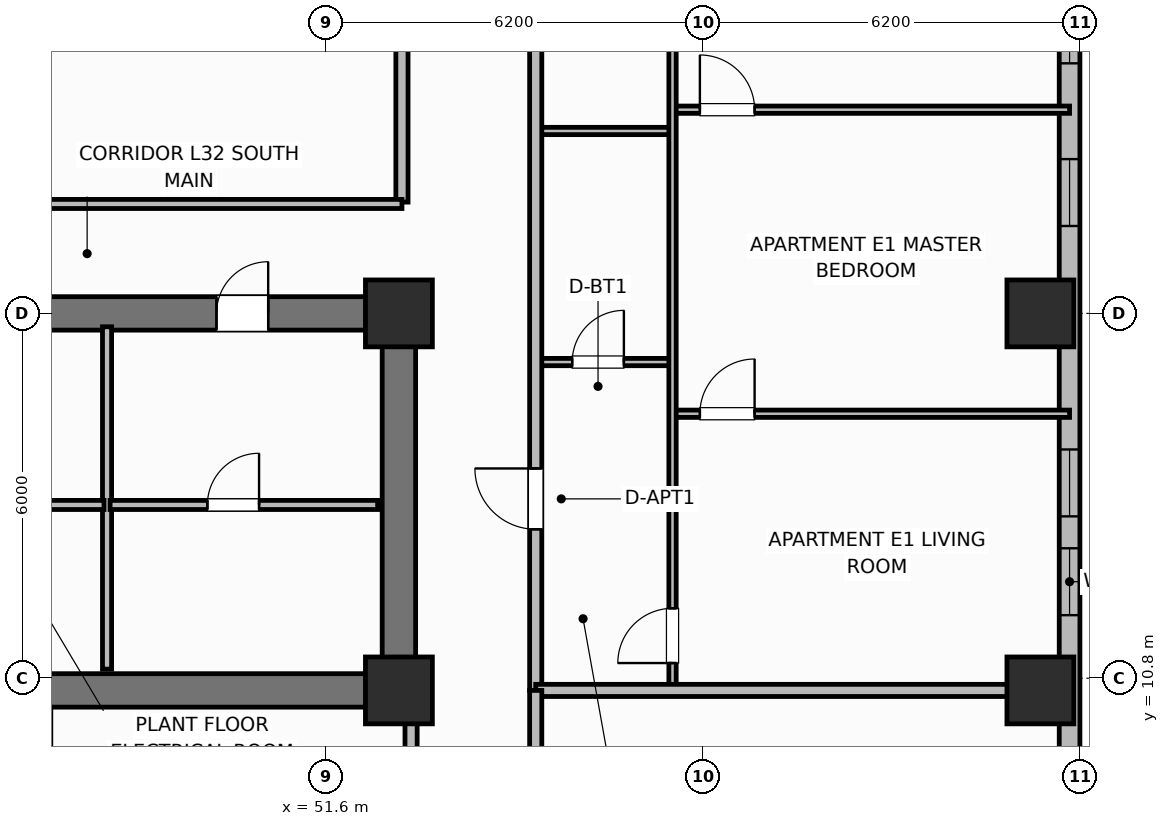
"""IFC4 building model, lengths in metres.
Left out: names, types, materials, properties, quantities, classifications, styles, units other than length and angle.
Written with IfcOpenShell. Run it as: python <this file> out.ifc"""

import sys

from ifc_helpers import new_model, si_unit, direction, frame, frame_2d, origin, origin_2d, place, context, subcontext, project, spatial, rectangle, extrude, element, fill, save


model = new_model("IFC4")
c1 = context("Model", 3, precision=1e-05, world=origin(), true_north=direction((0.0, 1.0)))
c2 = subcontext(c1, "Body", "Model", "MODEL_VIEW")
j1 = project(units=[si_unit("LENGTHUNIT", "METRE"), si_unit("PLANEANGLEUNIT", "RADIAN")], contexts=[c1])
p1 = place(None, origin())
s1 = spatial("IfcSite", under=j1, at=p1, CompositionType="ELEMENT")
p2 = place(p1, origin())
s2 = spatial("IfcBuilding", under=s1, at=p2, CompositionType="ELEMENT")
p3 = place(p2, frame((0.0, 0.0, 129.0)))
s3 = spatial("IfcBuildingStorey", under=s2, at=p3, CompositionType="ELEMENT", Elevation=129.0)
p4 = place(p3, frame((52.8, 10.6, 0.0), z_axis=(0.0, 0.0, 1.0), x_axis=(-1.0, 0.0, 0.0)))
e1 = element("IfcWall", 1, at=p4, inside=s3, PredefinedType="SHEAR", context=c2, shape_type="SweptSolid", body=[
    extrude(rectangle(XDim=27.2, YDim=0.55, at=frame_2d((13.6, 0.0))), origin(), (0.0, 0.0, 1.0), 3.7),
])
p5 = place(p3, frame((52.8, 10.875, 0.0), z_axis=(0.0, 0.0, 1.0), x_axis=(0.0, 1.0, 0.0)))
e2 = element("IfcWall", 2, at=p5, inside=s3, PredefinedType="SHEAR", context=c2, shape_type="SweptSolid", body=[
    extrude(rectangle(XDim=5.65, YDim=0.55, at=frame_2d((2.825, 0.0))), origin(), (0.0, 0.0, 1.0), 3.7),
])
p6 = place(p3, frame((25.6, 16.8, 0.0), z_axis=(0.0, 0.0, 1.0), x_axis=(1.0, 0.0, 0.0)))
e3 = element("IfcWall", 3, at=p6, inside=s3, PredefinedType="SHEAR", context=c2, shape_type="SweptSolid", body=[
    extrude(rectangle(XDim=27.2, YDim=0.55, at=frame_2d((13.6, 0.0))), origin(), (0.0, 0.0, 1.0), 3.7),
])
p7 = place(p6, frame((1.7, 0.0, 0.0)))
e4 = element("IfcOpeningElement", 4, at=p7, cuts=e3, PredefinedType="OPENING", context=c2, shape_type="SweptSolid", body=[
    extrude(rectangle(XDim=1.1, YDim=2.15, at=frame_2d((0.55, 1.075))), frame((0.0, 0.285, 0.0), z_axis=(0.0, -1.0, 0.0), x_axis=(1.0, 0.0, 0.0)), (0.0, 0.0, 1.0), 0.57),
])
p8 = place(p6, frame((4.45, 0.0, 0.0)))
e5 = element("IfcOpeningElement", 5, at=p8, cuts=e3, PredefinedType="OPENING", context=c2, shape_type="SweptSolid", body=[
    extrude(rectangle(XDim=0.85, YDim=2.1, at=frame_2d((0.425, 1.05))), frame((0.0, 0.285, 0.0), z_axis=(0.0, -1.0, 0.0), x_axis=(1.0, 0.0, 0.0)), (0.0, 0.0, 1.0), 0.57),
])
p9 = place(p6, frame((6.5, 0.0, 0.0)))
e6 = element("IfcOpeningElement", 6, at=p9, cuts=e3, PredefinedType="OPENING", context=c2, shape_type="SweptSolid", body=[
    extrude(rectangle(XDim=0.85, YDim=2.1, at=frame_2d((0.425, 1.05))), frame((0.0, 0.285, 0.0), z_axis=(0.0, -1.0, 0.0), x_axis=(1.0, 0.0, 0.0)), (0.0, 0.0, 1.0), 0.57),
])
p10 = place(p6, frame((13.0, 0.0, 0.0)))
e7 = element("IfcOpeningElement", 7, at=p10, cuts=e3, PredefinedType="OPENING", context=c2, shape_type="SweptSolid", body=[
    extrude(rectangle(XDim=1.2, YDim=2.15, at=frame_2d((0.6, 1.075))), frame((0.0, 0.285, 0.0), z_axis=(0.0, -1.0, 0.0), x_axis=(1.0, 0.0, 0.0)), (0.0, 0.0, 1.0), 0.57),
])
p11 = place(p6, frame((19.8, 0.0, 0.0)))
e8 = element("IfcOpeningElement", 8, at=p11, cuts=e3, PredefinedType="OPENING", context=c2, shape_type="SweptSolid", body=[
    extrude(rectangle(XDim=0.85, YDim=2.1, at=frame_2d((0.425, 1.05))), frame((0.0, 0.285, 0.0), z_axis=(0.0, -1.0, 0.0), x_axis=(1.0, 0.0, 0.0)), (0.0, 0.0, 1.0), 0.57),
])
p12 = place(p6, frame((24.2, 0.0, 0.0)))
e9 = element("IfcOpeningElement", 9, at=p12, cuts=e3, PredefinedType="OPENING", context=c2, shape_type="SweptSolid", body=[
    extrude(rectangle(XDim=0.85, YDim=2.1, at=frame_2d((0.425, 1.05))), frame((0.0, 0.285, 0.0), z_axis=(0.0, -1.0, 0.0), x_axis=(1.0, 0.0, 0.0)), (0.0, 0.0, 1.0), 0.57),
])
for number, where, z_axis, x_axis in (
    (10, (52.8, 10.6, 0.0), (0.0, 0.0, 1.0), (1.0, 0.0, 0.0)),
    (11, (52.8, 16.8, 0.0), (0.0, 0.0, 1.0), (1.0, 0.0, 0.0)),
    (12, (63.35, 10.6, 0.0), (0.0, 0.0, 1.0), (1.0, 0.0, 0.0)),
    (13, (63.35, 16.8, 0.0), (0.0, 0.0, 1.0), (1.0, 0.0, 0.0)),
):
    element("IfcColumn", number, at=place(p3, frame(where, z_axis=z_axis, x_axis=x_axis)), inside=s3, PredefinedType="COLUMN", context=c2, shape_type="SweptSolid", body=[
        extrude(rectangle(XDim=1.1, YDim=1.1, at=origin_2d()), origin(), (0.0, 0.0, 1.0), 3.7),
    ])
p13 = place(p3, frame((63.83, 9.0, 0.0), z_axis=(0.0, 0.0, 1.0), x_axis=(0.0, 1.0, 0.0)))
e14 = element("IfcWall", 14, at=p13, inside=s3, PredefinedType="SOLIDWALL", context=c2, shape_type="SweptSolid", body=[
    extrude(rectangle(XDim=14.8, YDim=0.34, at=frame_2d((7.4, 0.0))), origin(), (0.0, 0.0, 1.0), 2.7),
])
p14 = place(p13, frame((2.837, 0.0, 0.93)))
e15 = element("IfcOpeningElement", 15, at=p14, cuts=e14, PredefinedType="OPENING", context=c2, shape_type="SweptSolid", body=[
    extrude(rectangle(XDim=1.1, YDim=1.65, at=frame_2d((0.55, 0.825))), frame((0.0, 0.18, 0.0), z_axis=(0.0, -1.0, 0.0), x_axis=(1.0, 0.0, 0.0)), (0.0, 0.0, 1.0), 0.36),
])
p15 = place(p13, frame((4.462, 0.0, 0.93)))
e16 = element("IfcOpeningElement", 16, at=p15, cuts=e14, PredefinedType="OPENING", context=c2, shape_type="SweptSolid", body=[
    extrude(rectangle(XDim=1.1, YDim=1.65, at=frame_2d((0.55, 0.825))), frame((0.0, 0.18, 0.0), z_axis=(0.0, -1.0, 0.0), x_axis=(1.0, 0.0, 0.0)), (0.0, 0.0, 1.0), 0.36),
])
p16 = place(p13, frame((9.238, 0.0, 0.93)))
e17 = element("IfcOpeningElement", 17, at=p16, cuts=e14, PredefinedType="OPENING", context=c2, shape_type="SweptSolid", body=[
    extrude(rectangle(XDim=1.1, YDim=1.65, at=frame_2d((0.55, 0.825))), frame((0.0, 0.18, 0.0), z_axis=(0.0, -1.0, 0.0), x_axis=(1.0, 0.0, 0.0)), (0.0, 0.0, 1.0), 0.36),
])
p17 = place(p13, frame((11.913, 0.0, 0.93)))
e18 = element("IfcOpeningElement", 18, at=p17, cuts=e14, PredefinedType="OPENING", context=c2, shape_type="SweptSolid", body=[
    extrude(rectangle(XDim=1.1, YDim=1.65, at=frame_2d((0.55, 0.825))), frame((0.0, 0.18, 0.0), z_axis=(0.0, -1.0, 0.0), x_axis=(1.0, 0.0, 0.0)), (0.0, 0.0, 1.0), 0.36),
])
p18 = place(p3, frame((48.0, 10.95, 0.0), z_axis=(0.0, 0.0, 1.0), x_axis=(0.0, 1.0, 0.0)))
e19 = element("IfcWall", 19, at=p18, inside=s3, PredefinedType="PARTITIONING", context=c2, shape_type="SweptSolid", body=[
    extrude(rectangle(XDim=5.63, YDim=0.15, at=frame_2d((2.815, 0.0))), origin(), (0.0, 0.0, 1.0), 2.53),
])
p19 = place(p3, frame((43.55, 13.65, 0.0), z_axis=(0.0, 0.0, 1.0), x_axis=(1.0, 0.0, 0.0)))
e20 = element("IfcWall", 20, at=p19, inside=s3, PredefinedType="PARTITIONING", context=c2, shape_type="SweptSolid", body=[
    extrude(rectangle(XDim=4.4, YDim=0.15, at=frame_2d((2.2, 0.0))), origin(), (0.0, 0.0, 1.0), 2.53),
])
p20 = place(p19, frame((1.6, 0.0, 0.0)))
e21 = element("IfcOpeningElement", 21, at=p20, cuts=e20, PredefinedType="OPENING", context=c2, shape_type="SweptSolid", body=[
    extrude(rectangle(XDim=0.85, YDim=2.1, at=frame_2d((0.425, 1.05))), frame((0.0, 0.085, 0.0), z_axis=(0.0, -1.0, 0.0), x_axis=(1.0, 0.0, 0.0)), (0.0, 0.0, 1.0), 0.17),
])
p21 = place(p3, frame((48.05, 13.65, 0.0), z_axis=(0.0, 0.0, 1.0), x_axis=(1.0, 0.0, 0.0)))
e22 = element("IfcWall", 22, at=p21, inside=s3, PredefinedType="PARTITIONING", context=c2, shape_type="SweptSolid", body=[
    extrude(rectangle(XDim=4.4, YDim=0.15, at=frame_2d((2.2, 0.0))), origin(), (0.0, 0.0, 1.0), 2.53),
])
p22 = place(p21, frame((1.6, 0.0, 0.0)))
e23 = element("IfcOpeningElement", 23, at=p22, cuts=e22, PredefinedType="OPENING", context=c2, shape_type="SweptSolid", body=[
    extrude(rectangle(XDim=0.85, YDim=2.1, at=frame_2d((0.425, 1.05))), frame((0.0, 0.085, 0.0), z_axis=(0.0, -1.0, 0.0), x_axis=(1.0, 0.0, 0.0)), (0.0, 0.0, 1.0), 0.17),
])
p23 = place(p3, frame((52.85, 18.63, 0.0), z_axis=(0.0, 0.0, 1.0), x_axis=(0.0, 1.0, 0.0)))
e24 = element("IfcWall", 24, at=p23, inside=s3, PredefinedType="PARTITIONING", context=c2, shape_type="SweptSolid", body=[
    extrude(rectangle(XDim=19.14, YDim=0.2, at=frame_2d((9.57, 0.0))), origin(), (0.0, 0.0, 1.0), 2.53),
])
p24 = place(p3, frame((46.35, 18.6, 0.0), z_axis=(0.0, 0.0, 1.0), x_axis=(1.0, 0.0, 0.0)))
e25 = element("IfcWall", 25, at=p24, inside=s3, PredefinedType="PARTITIONING", context=c2, shape_type="SweptSolid", body=[
    extrude(rectangle(XDim=6.5, YDim=0.15, at=frame_2d((3.25, 0.0))), origin(), (0.0, 0.0, 1.0), 2.53),
])
p25 = place(p3, frame((55.05, 16.0, 0.0), z_axis=(0.0, 0.0, 1.0), x_axis=(1.0, 0.0, 0.0)))
e26 = element("IfcWall", 26, at=p25, inside=s3, PredefinedType="PARTITIONING", context=c2, shape_type="SweptSolid", body=[
    extrude(rectangle(XDim=2.25, YDim=0.12, at=frame_2d((1.125, 0.0))), origin(), (0.0, 0.0, 1.0), 2.53),
])
p26 = place(p25, frame((0.6, 0.0, 0.0)))
e27 = element("IfcOpeningElement", 27, at=p26, cuts=e26, PredefinedType="OPENING", context=c2, shape_type="SweptSolid", body=[
    extrude(rectangle(XDim=0.85, YDim=2.1, at=frame_2d((0.425, 1.05))), frame((0.0, 0.07, 0.0), z_axis=(0.0, -1.0, 0.0), x_axis=(1.0, 0.0, 0.0)), (0.0, 0.0, 1.0), 0.14),
])
p27 = place(p3, frame((55.05, 19.8, 0.0), z_axis=(0.0, 0.0, 1.0), x_axis=(1.0, 0.0, 0.0)))
e28 = element("IfcWall", 28, at=p27, inside=s3, PredefinedType="PARTITIONING", context=c2, shape_type="SweptSolid", body=[
    extrude(rectangle(XDim=2.25, YDim=0.12, at=frame_2d((1.125, 0.0))), origin(), (0.0, 0.0, 1.0), 2.53),
])
p28 = place(p3, frame((57.3, 15.15, 0.0), z_axis=(0.0, 0.0, 1.0), x_axis=(1.0, 0.0, 0.0)))
e29 = element("IfcWall", 29, at=p28, inside=s3, PredefinedType="PARTITIONING", context=c2, shape_type="SweptSolid", body=[
    extrude(rectangle(XDim=6.53, YDim=0.12, at=frame_2d((3.265, 0.0))), origin(), (0.0, 0.0, 1.0), 2.53),
])
p29 = place(p28, frame((0.45, 0.0, 0.0)))
e30 = element("IfcOpeningElement", 30, at=p29, cuts=e29, PredefinedType="OPENING", context=c2, shape_type="SweptSolid", body=[
    extrude(rectangle(XDim=0.9, YDim=2.1, at=frame_2d((0.45, 1.05))), frame((0.0, 0.07, 0.0), z_axis=(0.0, -1.0, 0.0), x_axis=(1.0, 0.0, 0.0)), (0.0, 0.0, 1.0), 0.14),
])
p30 = place(p3, frame((57.3, 20.15, 0.0), z_axis=(0.0, 0.0, 1.0), x_axis=(1.0, 0.0, 0.0)))
e31 = element("IfcWall", 31, at=p30, inside=s3, PredefinedType="PARTITIONING", context=c2, shape_type="SweptSolid", body=[
    extrude(rectangle(XDim=6.53, YDim=0.12, at=frame_2d((3.265, 0.0))), origin(), (0.0, 0.0, 1.0), 2.53),
])
p31 = place(p30, frame((0.45, 0.0, 0.0)))
e32 = element("IfcOpeningElement", 32, at=p31, cuts=e31, PredefinedType="OPENING", context=c2, shape_type="SweptSolid", body=[
    extrude(rectangle(XDim=0.9, YDim=2.1, at=frame_2d((0.45, 1.05))), frame((0.0, 0.07, 0.0), z_axis=(0.0, -1.0, 0.0), x_axis=(1.0, 0.0, 0.0)), (0.0, 0.0, 1.0), 0.14),
])
p32 = place(p3, frame((57.3, 10.64, 0.0), z_axis=(0.0, 0.0, 1.0), x_axis=(0.0, 1.0, 0.0)))
e33 = element("IfcWall", 33, at=p32, inside=s3, PredefinedType="PARTITIONING", context=c2, shape_type="SweptSolid", body=[
    extrude(rectangle(XDim=19.12, YDim=0.12, at=frame_2d((9.56, 0.0))), origin(), (0.0, 0.0, 1.0), 2.53),
])
p33 = place(p32, frame((0.41, 0.0, 0.0)))
e34 = element("IfcOpeningElement", 34, at=p33, cuts=e33, PredefinedType="OPENING", context=c2, shape_type="SweptSolid", body=[
    extrude(rectangle(XDim=0.9, YDim=2.1, at=frame_2d((0.45, 1.05))), frame((0.0, 0.07, 0.0), z_axis=(0.0, -1.0, 0.0), x_axis=(1.0, 0.0, 0.0)), (0.0, 0.0, 1.0), 0.14),
])
p34 = place(p32, frame((12.105, 0.0, 0.0)))
e35 = element("IfcOpeningElement", 35, at=p34, cuts=e33, PredefinedType="OPENING", context=c2, shape_type="SweptSolid", body=[
    extrude(rectangle(XDim=0.82, YDim=2.08, at=frame_2d((0.41, 1.04))), frame((0.0, 0.07, 0.0), z_axis=(0.0, -1.0, 0.0), x_axis=(1.0, 0.0, 0.0)), (0.0, 0.0, 1.0), 0.14),
])
p35 = place(p3, frame((55.05, 10.6, 0.0), z_axis=(0.0, 0.0, 1.0), x_axis=(0.0, 1.0, 0.0)))
e36 = element("IfcWall", 36, at=p35, inside=s3, PredefinedType="PARTITIONING", context=c2, shape_type="SweptSolid", body=[
    extrude(rectangle(XDim=35.2, YDim=0.2, at=frame_2d((17.6, 0.0))), origin(), (0.0, 0.0, 1.0), 2.53),
])
p36 = place(p35, frame((2.65, 0.0, 0.0)))
e37 = element("IfcOpeningElement", 37, at=p36, cuts=e36, PredefinedType="OPENING", context=c2, shape_type="SweptSolid", body=[
    extrude(rectangle(XDim=1.0, YDim=2.15, at=frame_2d((0.5, 1.075))), frame((0.0, 0.11, 0.0), z_axis=(0.0, -1.0, 0.0), x_axis=(1.0, 0.0, 0.0)), (0.0, 0.0, 1.0), 0.22),
])
p37 = place(p35, frame((22.75, 0.0, 0.0)))
e38 = element("IfcOpeningElement", 38, at=p37, cuts=e36, PredefinedType="OPENING", context=c2, shape_type="SweptSolid", body=[
    extrude(rectangle(XDim=1.0, YDim=2.15, at=frame_2d((0.5, 1.075))), frame((0.0, 0.11, 0.0), z_axis=(0.0, -1.0, 0.0), x_axis=(1.0, 0.0, 0.0)), (0.0, 0.0, 1.0), 0.22),
])
p38 = place(p3, frame((55.05, 10.6, 0.0), z_axis=(0.0, 0.0, 1.0), x_axis=(1.0, 0.0, 0.0)))
e39 = element("IfcWall", 39, at=p38, inside=s3, PredefinedType="PARTITIONING", context=c2, shape_type="SweptSolid", body=[
    extrude(rectangle(XDim=8.36, YDim=0.2, at=frame_2d((4.18, 0.0))), origin(), (0.0, 0.0, 1.0), 2.53),
])
p39 = place(p3, frame((55.05, 4.97, 0.0), z_axis=(0.0, 0.0, 1.0), x_axis=(0.0, 1.0, 0.0)))
e40 = element("IfcWall", 40, at=p39, inside=s3, PredefinedType="PARTITIONING", context=c2, shape_type="SweptSolid", body=[
    extrude(rectangle(XDim=5.63, YDim=0.2, at=frame_2d((2.815, 0.0))), origin(), (0.0, 0.0, 1.0), 2.53),
])
p40 = place(p3, frame((53.0, 6.17, 0.0), z_axis=(0.0, 0.0, 1.0), x_axis=(0.0, 1.0, 0.0)))
e41 = element("IfcWall", 41, at=p40, inside=s3, PredefinedType="PARTITIONING", context=c2, shape_type="SweptSolid", body=[
    extrude(rectangle(XDim=4.13, YDim=0.2, at=frame_2d((2.065, 0.0))), origin(), (0.0, 0.0, 1.0), 2.53),
])
p41 = place(p40, frame((0.65, 0.0, 0.0)))
e42 = element("IfcOpeningElement", 42, at=p41, cuts=e41, PredefinedType="OPENING", context=c2, shape_type="SweptSolid", body=[
    extrude(rectangle(XDim=0.9, YDim=2.1, at=frame_2d((0.45, 1.05))), frame((0.0, 0.11, 0.0), z_axis=(0.0, -1.0, 0.0), x_axis=(1.0, 0.0, 0.0)), (0.0, 0.0, 1.0), 0.22),
])
p42 = place(p14, origin())
e43 = element("IfcWindow", 43, at=p42, inside=s3, PartitioningType="SINGLE_PANEL", PredefinedType="WINDOW", context=c2, shape_type="SweptSolid", body=[
    extrude(rectangle(XDim=1.1, YDim=1.65, at=frame_2d((0.55, 0.825))), frame((0.0, 0.03, 0.0), z_axis=(0.0, -1.0, 0.0), x_axis=(1.0, 0.0, 0.0)), (0.0, 0.0, 1.0), 0.06),
])
fill(e15, e43)
p43 = place(p15, origin())
e44 = element("IfcWindow", 44, at=p43, inside=s3, PartitioningType="SINGLE_PANEL", PredefinedType="WINDOW", context=c2, shape_type="SweptSolid", body=[
    extrude(rectangle(XDim=1.1, YDim=1.65, at=frame_2d((0.55, 0.825))), frame((0.0, 0.03, 0.0), z_axis=(0.0, -1.0, 0.0), x_axis=(1.0, 0.0, 0.0)), (0.0, 0.0, 1.0), 0.06),
])
fill(e16, e44)
p44 = place(p16, origin())
e45 = element("IfcWindow", 45, at=p44, inside=s3, PartitioningType="SINGLE_PANEL", PredefinedType="WINDOW", context=c2, shape_type="SweptSolid", body=[
    extrude(rectangle(XDim=1.1, YDim=1.65, at=frame_2d((0.55, 0.825))), frame((0.0, 0.03, 0.0), z_axis=(0.0, -1.0, 0.0), x_axis=(1.0, 0.0, 0.0)), (0.0, 0.0, 1.0), 0.06),
])
fill(e17, e45)
p45 = place(p17, origin())
e46 = element("IfcWindow", 46, at=p45, inside=s3, PartitioningType="SINGLE_PANEL", PredefinedType="WINDOW", context=c2, shape_type="SweptSolid", body=[
    extrude(rectangle(XDim=1.1, YDim=1.65, at=frame_2d((0.55, 0.825))), frame((0.0, 0.03, 0.0), z_axis=(0.0, -1.0, 0.0), x_axis=(1.0, 0.0, 0.0)), (0.0, 0.0, 1.0), 0.06),
])
fill(e18, e46)
p46 = place(p22, origin())
e47 = element("IfcDoor", 47, at=p46, inside=s3, OperationType="SINGLE_SWING_RIGHT", PredefinedType="DOOR", context=c2, shape_type="SweptSolid", body=[
    extrude(rectangle(XDim=0.85, YDim=2.1, at=frame_2d((0.425, 1.05))), frame((0.0, 0.025, 0.0), z_axis=(0.0, -1.0, 0.0), x_axis=(1.0, 0.0, 0.0)), (0.0, 0.0, 1.0), 0.05),
])
fill(e23, e47)
p47 = place(p26, origin())
e48 = element("IfcDoor", 48, at=p47, inside=s3, OperationType="SINGLE_SWING_RIGHT", PredefinedType="DOOR", context=c2, shape_type="SweptSolid", body=[
    extrude(rectangle(XDim=0.85, YDim=2.1, at=frame_2d((0.425, 1.05))), frame((0.0, 0.025, 0.0), z_axis=(0.0, -1.0, 0.0), x_axis=(1.0, 0.0, 0.0)), (0.0, 0.0, 1.0), 0.05),
])
fill(e27, e48)
p48 = place(p29, origin())
e49 = element("IfcDoor", 49, at=p48, inside=s3, OperationType="SINGLE_SWING_RIGHT", PredefinedType="DOOR", context=c2, shape_type="SweptSolid", body=[
    extrude(rectangle(XDim=0.9, YDim=2.1, at=frame_2d((0.45, 1.05))), frame((0.0, 0.025, 0.0), z_axis=(0.0, -1.0, 0.0), x_axis=(1.0, 0.0, 0.0)), (0.0, 0.0, 1.0), 0.05),
])
fill(e30, e49)
p49 = place(p31, origin())
e50 = element("IfcDoor", 50, at=p49, inside=s3, OperationType="SINGLE_SWING_LEFT", PredefinedType="DOOR", context=c2, shape_type="SweptSolid", body=[
    extrude(rectangle(XDim=0.9, YDim=2.1, at=frame_2d((0.45, 1.05))), frame((0.0, 0.025, 0.0), z_axis=(0.0, -1.0, 0.0), x_axis=(1.0, 0.0, 0.0)), (0.0, 0.0, 1.0), 0.05),
])
fill(e32, e50)
p50 = place(p33, origin())
e51 = element("IfcDoor", 51, at=p50, inside=s3, OperationType="SINGLE_SWING_LEFT", PredefinedType="DOOR", context=c2, shape_type="SweptSolid", body=[
    extrude(rectangle(XDim=0.9, YDim=2.1, at=frame_2d((0.45, 1.05))), frame((0.0, 0.025, 0.0), z_axis=(0.0, -1.0, 0.0), x_axis=(1.0, 0.0, 0.0)), (0.0, 0.0, 1.0), 0.05),
])
fill(e34, e51)
p51 = place(p36, origin())
e52 = element("IfcDoor", 52, at=p51, inside=s3, OperationType="SINGLE_SWING_RIGHT", PredefinedType="DOOR", context=c2, shape_type="SweptSolid", body=[
    extrude(rectangle(XDim=1.0, YDim=2.15, at=frame_2d((0.5, 1.075))), frame((0.0, 0.025, 0.0), z_axis=(0.0, -1.0, 0.0), x_axis=(1.0, 0.0, 0.0)), (0.0, 0.0, 1.0), 0.05),
])
fill(e37, e52)
p52 = place(p12, origin())
e53 = element("IfcDoor", 53, at=p52, inside=s3, OperationType="SINGLE_SWING_RIGHT", PredefinedType="DOOR", context=c2, shape_type="SweptSolid", body=[
    extrude(rectangle(XDim=0.85, YDim=2.1, at=frame_2d((0.425, 1.05))), frame((0.0, 0.025, 0.0), z_axis=(0.0, -1.0, 0.0), x_axis=(1.0, 0.0, 0.0)), (0.0, 0.0, 1.0), 0.05),
])
fill(e9, e53)
save(model, sys.argv[1])
